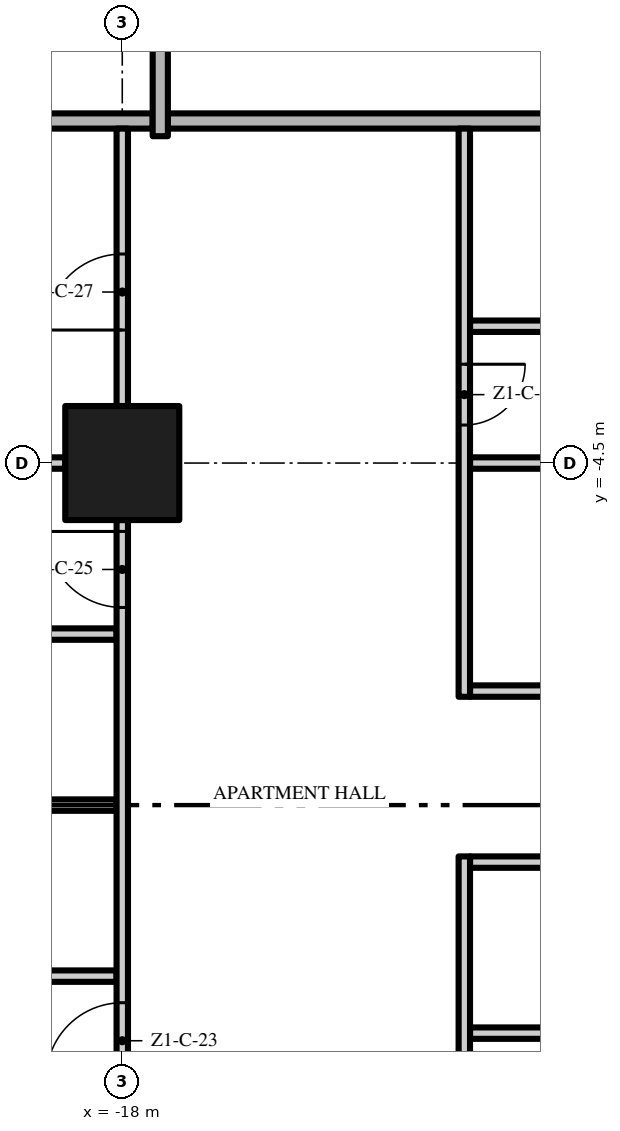
"""IFC4 building model, lengths in metres.
Left out: names, types, materials, properties, quantities, classifications, styles, units other than length and angle.
Written with IfcOpenShell. Run it as: python <this file> out.ifc"""

import sys

from ifc_helpers import new_model, si_unit, direction, frame, frame_2d, origin, origin_2d, place, context, subcontext, project, spatial, rectangle, extrude, element, fill, save


model = new_model("IFC4")
c1 = context("Model", 3, precision=1e-05, world=origin(), true_north=direction((0.0, 1.0)))
c2 = subcontext(c1, "Body", "Model", "MODEL_VIEW")
j1 = project(units=[si_unit("LENGTHUNIT", "METRE"), si_unit("PLANEANGLEUNIT", "RADIAN")], contexts=[c1])
p1 = place(None, origin())
s1 = spatial("IfcSite", under=j1, at=p1, CompositionType="ELEMENT")
p2 = place(p1, origin())
s2 = spatial("IfcBuilding", under=s1, at=p2, CompositionType="ELEMENT")
p3 = place(p2, frame((0.0, 0.0, 41.6)))
s3 = spatial("IfcBuildingStorey", under=s2, at=p3, CompositionType="ELEMENT", Elevation=41.6)
p4 = place(p3, frame((-18.0, -4.5, 0.0), z_axis=(0.0, 0.0, 1.0), x_axis=(1.0, 0.0, 0.0)))
e1 = element("IfcColumn", 1, at=p4, inside=s3, PredefinedType="COLUMN", context=c2, shape_type="SweptSolid", body=[
    extrude(rectangle(XDim=1.5, YDim=1.5, at=origin_2d()), origin(), (0.0, 0.0, 1.0), 3.5),
])
p5 = place(p3, frame((-13.425, -12.0, 0.0), z_axis=(0.0, 0.0, 1.0), x_axis=(1.0, 0.0, 0.0)))
e2 = element("IfcWall", 2, at=p5, inside=s3, PredefinedType="PARTITIONING", context=c2, shape_type="SweptSolid", body=[
    extrude(rectangle(XDim=4.35, YDim=0.15, at=frame_2d((2.175, 0.0))), origin(), (0.0, 0.0, 1.0), 3.5),
])
p6 = place(p3, frame((-20.925, -11.25, 0.0), z_axis=(0.0, 0.0, 1.0), x_axis=(1.0, 0.0, 0.0)))
e3 = element("IfcWall", 3, at=p6, inside=s3, PredefinedType="PARTITIONING", context=c2, shape_type="SweptSolid", body=[
    extrude(rectangle(XDim=2.85, YDim=0.15, at=frame_2d((1.425, 0.0))), origin(), (0.0, 0.0, 1.0), 3.5),
])
p7 = place(p3, frame((-9.075, -9.75, 0.0), z_axis=(0.0, 0.0, 1.0), x_axis=(-1.0, 0.0, 0.0)))
e4 = element("IfcWall", 4, at=p7, inside=s3, PredefinedType="PARTITIONING", context=c2, shape_type="SweptSolid", body=[
    extrude(rectangle(XDim=4.35, YDim=0.15, at=frame_2d((2.175, 0.0))), origin(), (0.0, 0.0, 1.0), 3.5),
])
p8 = place(p7, frame((1.7, 0.0, 0.0)))
e5 = element("IfcOpeningElement", 5, at=p8, cuts=e4, PredefinedType="OPENING", context=c2, shape_type="SweptSolid", body=[
    extrude(rectangle(XDim=0.9, YDim=2.1, at=frame_2d((0.45, 1.05))), frame((0.0, 0.085, 0.0), z_axis=(0.0, -1.0, 0.0), x_axis=(1.0, 0.0, 0.0)), (0.0, 0.0, 1.0), 0.17),
])
p9 = place(p3, frame((-20.925, -9.0, 0.0), z_axis=(0.0, 0.0, 1.0), x_axis=(1.0, 0.0, 0.0)))
e6 = element("IfcWall", 6, at=p9, inside=s3, PredefinedType="PARTITIONING", context=c2, shape_type="SweptSolid", body=[
    extrude(rectangle(XDim=2.85, YDim=0.15, at=frame_2d((1.425, 0.0))), origin(), (0.0, 0.0, 1.0), 3.5),
])
p10 = place(p3, frame((-13.425, -7.5, 0.0), z_axis=(0.0, 0.0, 1.0), x_axis=(1.0, 0.0, 0.0)))
e7 = element("IfcWall", 7, at=p10, inside=s3, PredefinedType="PARTITIONING", context=c2, shape_type="SweptSolid", body=[
    extrude(rectangle(XDim=4.35, YDim=0.15, at=frame_2d((2.175, 0.0))), origin(), (0.0, 0.0, 1.0), 3.5),
])
p11 = place(p3, frame((-20.925, -6.75, 0.0), z_axis=(0.0, 0.0, 1.0), x_axis=(1.0, 0.0, 0.0)))
e8 = element("IfcWall", 8, at=p11, inside=s3, PredefinedType="PARTITIONING", context=c2, shape_type="SweptSolid", body=[
    extrude(rectangle(XDim=2.85, YDim=0.15, at=frame_2d((1.425, 0.0))), origin(), (0.0, 0.0, 1.0), 3.5),
])
p12 = place(p3, frame((-25.6, -4.5, 0.0), z_axis=(0.0, 0.0, 1.0), x_axis=(1.0, 0.0, 0.0)))
e9 = element("IfcWall", 9, at=p12, inside=s3, PredefinedType="PARTITIONING", context=c2, shape_type="SweptSolid", body=[
    extrude(rectangle(XDim=6.85, YDim=0.15, at=frame_2d((3.425, 0.0))), origin(), (0.0, 0.0, 1.0), 3.5),
])
p13 = place(p3, frame((-13.425, -4.5, 0.0), z_axis=(0.0, 0.0, 1.0), x_axis=(1.0, 0.0, 0.0)))
e10 = element("IfcWall", 10, at=p13, inside=s3, PredefinedType="PARTITIONING", context=c2, shape_type="SweptSolid", body=[
    extrude(rectangle(XDim=3.675, YDim=0.15, at=frame_2d((1.837, 0.0))), origin(), (0.0, 0.0, 1.0), 3.5),
])
p14 = place(p3, frame((-13.425, -2.7, 0.0), z_axis=(0.0, 0.0, 1.0), x_axis=(1.0, 0.0, 0.0)))
e11 = element("IfcWall", 11, at=p14, inside=s3, PredefinedType="PARTITIONING", context=c2, shape_type="SweptSolid", body=[
    extrude(rectangle(XDim=4.35, YDim=0.15, at=frame_2d((2.175, 0.0))), origin(), (0.0, 0.0, 1.0), 3.5),
])
p15 = place(p3, frame((-17.4, 0.0, 0.0), z_axis=(0.0, 0.0, 1.0), x_axis=(1.0, 0.0, 0.0)))
e12 = element("IfcWall", 12, at=p15, inside=s3, PredefinedType="PARTITIONING", context=c2, shape_type="SweptSolid", body=[
    extrude(rectangle(XDim=12.8, YDim=0.2, at=frame_2d((6.4, 0.0))), origin(), (0.0, 0.0, 1.0), 3.5),
])
p16 = place(p3, frame((-26.7, 0.0, 0.0), z_axis=(0.0, 0.0, 1.0), x_axis=(1.0, 0.0, 0.0)))
e13 = element("IfcWall", 13, at=p16, inside=s3, PredefinedType="PARTITIONING", context=c2, shape_type="SweptSolid", body=[
    extrude(rectangle(XDim=9.1, YDim=0.2, at=frame_2d((4.55, 0.0))), origin(), (0.0, 0.0, 1.0), 3.5),
])
p17 = place(p3, frame((-18.0, -12.75, 0.0), z_axis=(0.0, 0.0, 1.0), x_axis=(0.0, 1.0, 0.0)))
e14 = element("IfcWall", 14, at=p17, inside=s3, PredefinedType="PARTITIONING", context=c2, shape_type="SweptSolid", body=[
    extrude(rectangle(XDim=7.5, YDim=0.15, at=frame_2d((3.75, 0.0))), origin(), (0.0, 0.0, 1.0), 3.5),
])
p18 = place(p17, frame((0.15, 0.0, 0.0)))
e15 = element("IfcOpeningElement", 15, at=p18, cuts=e14, PredefinedType="OPENING", context=c2, shape_type="SweptSolid", body=[
    extrude(rectangle(XDim=1.0, YDim=2.4, at=frame_2d((0.5, 1.2))), frame((0.0, 0.085, 0.0), z_axis=(0.0, -1.0, 0.0), x_axis=(1.0, 0.0, 0.0)), (0.0, 0.0, 1.0), 0.17),
])
p19 = place(p17, frame((6.35, 0.0, 0.0)))
e16 = element("IfcOpeningElement", 16, at=p19, cuts=e14, PredefinedType="OPENING", context=c2, shape_type="SweptSolid", body=[
    extrude(rectangle(XDim=1.0, YDim=2.4, at=frame_2d((0.5, 1.2))), frame((0.0, 0.085, 0.0), z_axis=(0.0, -1.0, 0.0), x_axis=(1.0, 0.0, 0.0)), (0.0, 0.0, 1.0), 0.17),
])
p20 = place(p3, frame((-18.0, -3.75, 0.0), z_axis=(0.0, 0.0, 1.0), x_axis=(0.0, 1.0, 0.0)))
e17 = element("IfcWall", 17, at=p20, inside=s3, PredefinedType="PARTITIONING", context=c2, shape_type="SweptSolid", body=[
    extrude(rectangle(XDim=3.65, YDim=0.15, at=frame_2d((1.825, 0.0))), origin(), (0.0, 0.0, 1.0), 3.5),
])
p21 = place(p20, frame((1.0, 0.0, 0.0)))
e18 = element("IfcOpeningElement", 18, at=p21, cuts=e17, PredefinedType="OPENING", context=c2, shape_type="SweptSolid", body=[
    extrude(rectangle(XDim=1.0, YDim=2.4, at=frame_2d((0.5, 1.2))), frame((0.0, 0.085, 0.0), z_axis=(0.0, -1.0, 0.0), x_axis=(1.0, 0.0, 0.0)), (0.0, 0.0, 1.0), 0.17),
])
p22 = place(p3, frame((-17.5, -0.2, 0.0), z_axis=(0.0, 0.0, 1.0), x_axis=(0.0, 1.0, 0.0)))
e19 = element("IfcWall", 19, at=p22, inside=s3, PredefinedType="PARTITIONING", context=c2, shape_type="SweptSolid", body=[
    extrude(rectangle(XDim=3.95, YDim=0.2, at=frame_2d((1.975, 0.0))), origin(), (0.0, 0.0, 1.0), 3.5),
])
p23 = place(p3, frame((-13.5, -9.675, 0.0), z_axis=(0.0, 0.0, 1.0), x_axis=(0.0, -1.0, 0.0)))
e20 = element("IfcWall", 20, at=p23, inside=s3, PredefinedType="PARTITIONING", context=c2, shape_type="SweptSolid", body=[
    extrude(rectangle(XDim=12.525, YDim=0.15, at=frame_2d((6.263, 0.0))), origin(), (0.0, 0.0, 1.0), 3.5),
])
p24 = place(p23, frame((11.175, 0.0, 0.0)))
e21 = element("IfcOpeningElement", 21, at=p24, cuts=e20, PredefinedType="OPENING", context=c2, shape_type="SweptSolid", body=[
    extrude(rectangle(XDim=0.8, YDim=2.0, at=frame_2d((0.4, 1.0))), frame((0.0, 0.085, 0.0), z_axis=(0.0, -1.0, 0.0), x_axis=(1.0, 0.0, 0.0)), (0.0, 0.0, 1.0), 0.17),
])
p25 = place(p23, frame((4.825, 0.0, 0.0)))
e22 = element("IfcOpeningElement", 22, at=p25, cuts=e20, PredefinedType="OPENING", context=c2, shape_type="SweptSolid", body=[
    extrude(rectangle(XDim=1.0, YDim=2.4, at=frame_2d((0.5, 1.2))), frame((0.0, 0.085, 0.0), z_axis=(0.0, -1.0, 0.0), x_axis=(1.0, 0.0, 0.0)), (0.0, 0.0, 1.0), 0.17),
])
p26 = place(p3, frame((-13.5, -0.1, 0.0), z_axis=(0.0, 0.0, 1.0), x_axis=(0.0, -1.0, 0.0)))
e23 = element("IfcWall", 23, at=p26, inside=s3, PredefinedType="PARTITIONING", context=c2, shape_type="SweptSolid", body=[
    extrude(rectangle(XDim=7.475, YDim=0.15, at=frame_2d((3.737, 0.0))), origin(), (0.0, 0.0, 1.0), 3.5),
])
p27 = place(p26, frame((3.1, 0.0, 0.0)))
e24 = element("IfcOpeningElement", 24, at=p27, cuts=e23, PredefinedType="OPENING", context=c2, shape_type="SweptSolid", body=[
    extrude(rectangle(XDim=0.8, YDim=2.0, at=frame_2d((0.4, 1.0))), frame((0.0, 0.085, 0.0), z_axis=(0.0, -1.0, 0.0), x_axis=(1.0, 0.0, 0.0)), (0.0, 0.0, 1.0), 0.17),
])
p28 = place(p27, origin())
e25 = element("IfcDoor", 25, at=p28, inside=s3, OperationType="SINGLE_SWING_LEFT", PredefinedType="DOOR", context=c2, shape_type="SweptSolid", body=[
    extrude(rectangle(XDim=0.8, YDim=2.0, at=frame_2d((0.4, 1.0))), frame((0.0, 0.025, 0.0), z_axis=(0.0, -1.0, 0.0), x_axis=(1.0, 0.0, 0.0)), (0.0, 0.0, 1.0), 0.05),
])
fill(e24, e25)
p29 = place(p18, origin())
e26 = element("IfcDoor", 26, at=p29, inside=s3, OperationType="SINGLE_SWING_LEFT", PredefinedType="DOOR", context=c2, shape_type="SweptSolid", body=[
    extrude(rectangle(XDim=1.0, YDim=2.4, at=frame_2d((0.5, 1.2))), frame((0.0, 0.025, 0.0), z_axis=(0.0, -1.0, 0.0), x_axis=(1.0, 0.0, 0.0)), (0.0, 0.0, 1.0), 0.05),
])
fill(e15, e26)
p30 = place(p19, origin())
e27 = element("IfcDoor", 27, at=p30, inside=s3, OperationType="SINGLE_SWING_RIGHT", PredefinedType="DOOR", context=c2, shape_type="SweptSolid", body=[
    extrude(rectangle(XDim=1.0, YDim=2.4, at=frame_2d((0.5, 1.2))), frame((0.0, 0.025, 0.0), z_axis=(0.0, -1.0, 0.0), x_axis=(1.0, 0.0, 0.0)), (0.0, 0.0, 1.0), 0.05),
])
fill(e16, e27)
p31 = place(p21, origin())
e28 = element("IfcDoor", 28, at=p31, inside=s3, OperationType="SINGLE_SWING_LEFT", PredefinedType="DOOR", context=c2, shape_type="SweptSolid", body=[
    extrude(rectangle(XDim=1.0, YDim=2.4, at=frame_2d((0.5, 1.2))), frame((0.0, 0.025, 0.0), z_axis=(0.0, -1.0, 0.0), x_axis=(1.0, 0.0, 0.0)), (0.0, 0.0, 1.0), 0.05),
])
fill(e18, e28)
save(model, sys.argv[1])
